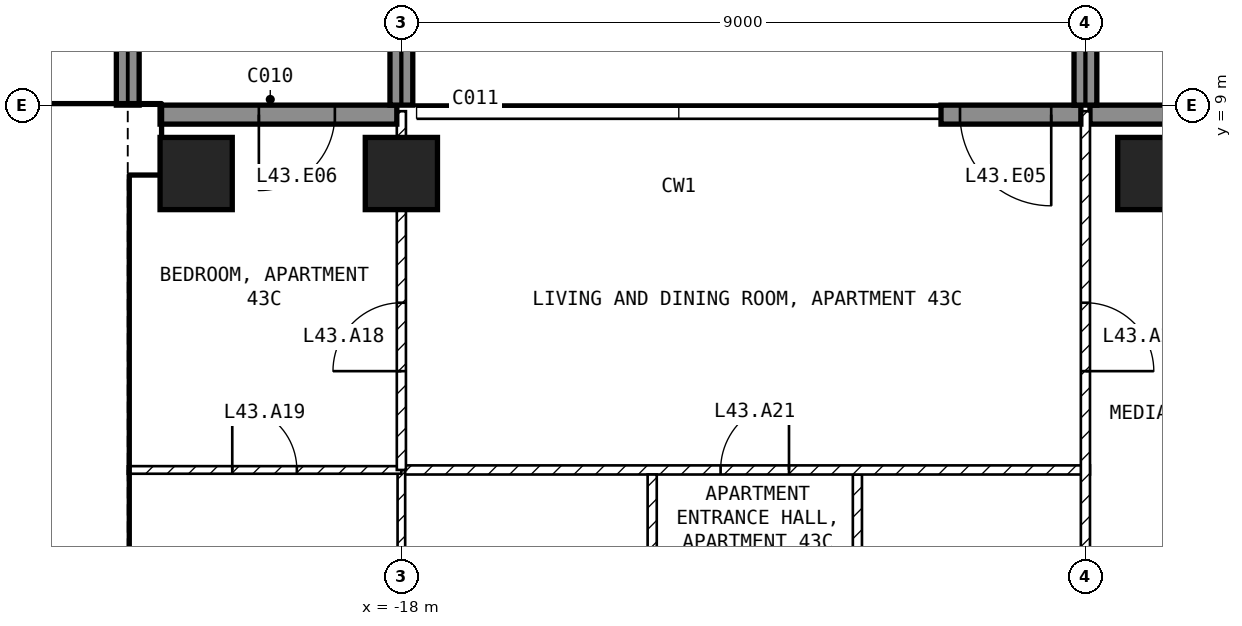
"""IFC4 building model, lengths in metres.
Left out: names, types, materials, properties, quantities, classifications, styles, units other than length and angle.
Written with IfcOpenShell. Run it as: python <this file> out.ifc"""

import sys

from ifc_helpers import new_model, si_unit, direction, frame, frame_2d, origin, origin_2d, place, context, subcontext, project, spatial, rectangle, extrude, element, fill, save


model = new_model("IFC4")
c1 = context("Model", 3, precision=1e-05, world=origin(), true_north=direction((0.0, 1.0)))
c2 = subcontext(c1, "Body", "Model", "MODEL_VIEW")
j1 = project(units=[si_unit("LENGTHUNIT", "METRE"), si_unit("PLANEANGLEUNIT", "RADIAN")], contexts=[c1])
p1 = place(None, origin())
s1 = spatial("IfcSite", under=j1, at=p1, CompositionType="ELEMENT")
p2 = place(p1, origin())
s2 = spatial("IfcBuilding", under=s1, at=p2, CompositionType="ELEMENT")
p3 = place(p2, frame((0.0, 0.0, 177.1)))
s3 = spatial("IfcBuildingStorey", under=s2, at=p3, CompositionType="ELEMENT", Elevation=177.1)
for number, where, z_axis, x_axis in (
    (1, (-20.7, 8.1, -0.25), (0.0, 0.0, 1.0), (1.0, 0.0, 0.0)),
    (2, (-18.0, 8.1, -0.25), (0.0, 0.0, 1.0), (1.0, 0.0, 0.0)),
    (3, (-8.1, 8.1, -0.25), (0.0, 0.0, 1.0), (1.0, 0.0, 0.0)),
):
    element("IfcColumn", number, at=place(p3, frame(where, z_axis=z_axis, x_axis=x_axis)), inside=s3, PredefinedType="COLUMN", context=c2, shape_type="SweptSolid", body=[
        extrude(rectangle(XDim=0.95, YDim=0.95, at=origin_2d()), origin(), (0.0, 0.0, 1.0), 3.5),
    ])
p4 = place(p3, frame((-5.825, 8.875, 0.0), z_axis=(0.0, 0.0, 1.0), x_axis=(-1.0, 0.0, 0.0)))
e4 = element("IfcWall", 4, at=p4, inside=s3, PredefinedType="SOLIDWALL", context=c2, shape_type="SweptSolid", body=[
    extrude(rectangle(XDim=3.115, YDim=0.25, at=frame_2d((1.558, 0.0))), origin(), (0.0, 0.0, 1.0), 3.25),
])
p5 = place(p4, frame((0.25, 0.0, 0.0)))
e5 = element("IfcOpeningElement", 5, at=p5, cuts=e4, PredefinedType="OPENING", context=c2, shape_type="SweptSolid", body=[
    extrude(rectangle(XDim=1.2, YDim=2.4, at=frame_2d((0.6, 1.2))), frame((0.0, 0.135, 0.0), z_axis=(0.0, -1.0, 0.0), x_axis=(1.0, 0.0, 0.0)), (0.0, 0.0, 1.0), 0.27),
])
p6 = place(p3, frame((-9.06, 8.875, 0.0), z_axis=(0.0, 0.0, 1.0), x_axis=(-1.0, 0.0, 0.0)))
e6 = element("IfcWall", 6, at=p6, inside=s3, PredefinedType="SOLIDWALL", context=c2, shape_type="SweptSolid", body=[
    extrude(rectangle(XDim=1.84, YDim=0.25, at=frame_2d((0.92, 0.0))), origin(), (0.0, 0.0, 1.0), 3.25),
])
p7 = place(p6, frame((0.39, 0.0, 0.0)))
e7 = element("IfcOpeningElement", 7, at=p7, cuts=e6, PredefinedType="OPENING", context=c2, shape_type="SweptSolid", body=[
    extrude(rectangle(XDim=1.2, YDim=2.4, at=frame_2d((0.6, 1.2))), frame((0.0, 0.135, 0.0), z_axis=(0.0, -1.0, 0.0), x_axis=(1.0, 0.0, 0.0)), (0.0, 0.0, 1.0), 0.27),
])
p8 = place(p3, frame((-18.06, 8.875, 0.0), z_axis=(0.0, 0.0, 1.0), x_axis=(-1.0, 0.0, 0.0)))
e8 = element("IfcWall", 8, at=p8, inside=s3, PredefinedType="SOLIDWALL", context=c2, shape_type="SweptSolid", body=[
    extrude(rectangle(XDim=3.115, YDim=0.25, at=frame_2d((1.558, 0.0))), origin(), (0.0, 0.0, 1.0), 3.25),
])
p9 = place(p8, frame((0.815, 0.0, 0.0)))
e9 = element("IfcOpeningElement", 9, at=p9, cuts=e8, PredefinedType="OPENING", context=c2, shape_type="SweptSolid", body=[
    extrude(rectangle(XDim=1.0, YDim=2.4, at=frame_2d((0.5, 1.2))), frame((0.0, 0.135, 0.0), z_axis=(0.0, -1.0, 0.0), x_axis=(1.0, 0.0, 0.0)), (0.0, 0.0, 1.0), 0.27),
])
for number, where, z_axis, x_axis in (
    (10, (-21.6, 9.0, 0.0), (0.0, 0.0, 1.0), (0.0, 1.0, 0.0)),
    (11, (-18.0, 9.0, 0.0), (0.0, 0.0, 1.0), (0.0, 1.0, 0.0)),
    (12, (-9.0, 9.0, 0.0), (0.0, 0.0, 1.0), (0.0, 1.0, 0.0)),
):
    element("IfcWall", number, at=place(p3, frame(where, z_axis=z_axis, x_axis=x_axis)), inside=s3, PredefinedType="SOLIDWALL", context=c2, shape_type="SweptSolid", body=[
        extrude(rectangle(XDim=2.7, YDim=0.3, at=frame_2d((1.35, 0.0))), origin(), (0.0, 0.0, 1.0), 3.25),
    ])
p10 = place(p3, frame((-29.6, 8.55, 0.0), z_axis=(0.0, 0.0, 1.0), x_axis=(1.0, 0.0, 0.0)))
e13 = element("IfcWall", 13, at=p10, inside=s3, PredefinedType="SHEAR", context=c2, shape_type="SweptSolid", body=[
    extrude(rectangle(XDim=8.425, YDim=0.9, at=frame_2d((4.212, 0.0))), origin(), (0.0, 0.0, 1.0), 3.25),
])
p11 = place(p3, frame((-21.825, 1.2, 0.0), z_axis=(0.0, 0.0, 1.0), x_axis=(0.0, 1.0, 0.0)))
e14 = element("IfcWall", 14, at=p11, inside=s3, PredefinedType="SHEAR", context=c2, shape_type="SweptSolid", body=[
    extrude(rectangle(XDim=6.9, YDim=0.45, at=frame_2d((3.45, 0.0))), origin(), (0.0, 0.0, 1.0), 3.25),
])
p12 = place(p3, frame((-28.35, 5.15, 0.0), z_axis=(0.0, 0.0, 1.0), x_axis=(1.0, 0.0, 0.0)))
e15 = element("IfcWall", 15, at=p12, inside=s3, PredefinedType="SOLIDWALL", context=c2, shape_type="SweptSolid", body=[
    extrude(rectangle(XDim=6.3, YDim=0.2, at=frame_2d((3.15, 0.0))), origin(), (0.0, 0.0, 1.0), 3.25),
])
p13 = place(p12, frame((5.1, 0.0, 0.0)))
e16 = element("IfcOpeningElement", 16, at=p13, cuts=e15, PredefinedType="OPENING", context=c2, shape_type="SweptSolid", body=[
    extrude(rectangle(XDim=1.0, YDim=2.1, at=frame_2d((0.5, 1.05))), frame((0.0, 0.11, 0.0), z_axis=(0.0, -1.0, 0.0), x_axis=(1.0, 0.0, 0.0)), (0.0, 0.0, 1.0), 0.22),
])
p14 = place(p3, frame((-12.0, 1.3, 0.0), z_axis=(0.0, 0.0, 1.0), x_axis=(0.0, 1.0, 0.0)))
e17 = element("IfcWall", 17, at=p14, inside=s3, PredefinedType="PARTITIONING", context=c2, shape_type="SweptSolid", body=[
    extrude(rectangle(XDim=2.84, YDim=0.12, at=frame_2d((1.42, 0.0))), origin(), (0.0, 0.0, 1.0), 3.25),
])
p15 = place(p14, frame((0.97, 0.0, 0.0)))
e18 = element("IfcOpeningElement", 18, at=p15, cuts=e17, PredefinedType="OPENING", context=c2, shape_type="SweptSolid", body=[
    extrude(rectangle(XDim=0.9, YDim=2.1, at=frame_2d((0.45, 1.05))), frame((0.0, 0.07, 0.0), z_axis=(0.0, -1.0, 0.0), x_axis=(1.0, 0.0, 0.0)), (0.0, 0.0, 1.0), 0.14),
])
p16 = place(p3, frame((-18.0, 4.2, 0.0), z_axis=(0.0, 0.0, 1.0), x_axis=(1.0, 0.0, 0.0)))
e19 = element("IfcWall", 19, at=p16, inside=s3, PredefinedType="PARTITIONING", context=c2, shape_type="SweptSolid", body=[
    extrude(rectangle(XDim=9.06, YDim=0.12, at=frame_2d((4.53, 0.0))), origin(), (0.0, 0.0, 1.0), 3.25),
])
p17 = place(p16, frame((4.2, 0.0, 0.0)))
e20 = element("IfcOpeningElement", 20, at=p17, cuts=e19, PredefinedType="OPENING", context=c2, shape_type="SweptSolid", body=[
    extrude(rectangle(XDim=0.9, YDim=2.1, at=frame_2d((0.45, 1.05))), frame((0.0, 0.07, 0.0), z_axis=(0.0, -1.0, 0.0), x_axis=(1.0, 0.0, 0.0)), (0.0, 0.0, 1.0), 0.14),
])
p18 = place(p3, frame((-9.0, 8.92, 0.0), z_axis=(0.0, 0.0, 1.0), x_axis=(0.0, -1.0, 0.0)))
e21 = element("IfcWall", 21, at=p18, inside=s3, PredefinedType="PARTITIONING", context=c2, shape_type="SweptSolid", body=[
    extrude(rectangle(XDim=7.62, YDim=0.12, at=frame_2d((3.81, 0.0))), origin(), (0.0, 0.0, 1.0), 3.25),
])
p19 = place(p18, frame((2.52, 0.0, 0.0)))
e22 = element("IfcOpeningElement", 22, at=p19, cuts=e21, PredefinedType="OPENING", context=c2, shape_type="SweptSolid", body=[
    extrude(rectangle(XDim=0.9, YDim=2.1, at=frame_2d((0.45, 1.05))), frame((0.0, 0.07, 0.0), z_axis=(0.0, -1.0, 0.0), x_axis=(1.0, 0.0, 0.0)), (0.0, 0.0, 1.0), 0.14),
])
p20 = place(p3, frame((-14.7, 1.3, 0.0), z_axis=(0.0, 0.0, 1.0), x_axis=(0.0, 1.0, 0.0)))
e23 = element("IfcWall", 23, at=p20, inside=s3, PredefinedType="PARTITIONING", context=c2, shape_type="SweptSolid", body=[
    extrude(rectangle(XDim=2.84, YDim=0.12, at=frame_2d((1.42, 0.0))), origin(), (0.0, 0.0, 1.0), 3.25),
])
p21 = place(p20, frame((0.97, 0.0, 0.0)))
e24 = element("IfcOpeningElement", 24, at=p21, cuts=e23, PredefinedType="OPENING", context=c2, shape_type="SweptSolid", body=[
    extrude(rectangle(XDim=0.9, YDim=2.1, at=frame_2d((0.45, 1.05))), frame((0.0, 0.07, 0.0), z_axis=(0.0, -1.0, 0.0), x_axis=(1.0, 0.0, 0.0)), (0.0, 0.0, 1.0), 0.14),
])
p22 = place(p3, frame((-18.0, 1.3, 0.0), z_axis=(0.0, 0.0, 1.0), x_axis=(0.0, 1.0, 0.0)))
e25 = element("IfcWall", 25, at=p22, inside=s3, PredefinedType="PARTITIONING", context=c2, shape_type="SweptSolid", body=[
    extrude(rectangle(XDim=2.9, YDim=0.1, at=frame_2d((1.45, 0.0))), origin(), (0.0, 0.0, 1.0), 2.48),
])
p23 = place(p3, frame((-21.6, 4.2, 0.0), z_axis=(0.0, 0.0, 1.0), x_axis=(1.0, 0.0, 0.0)))
e26 = element("IfcWall", 26, at=p23, inside=s3, PredefinedType="PARTITIONING", context=c2, shape_type="SweptSolid", body=[
    extrude(rectangle(XDim=3.6, YDim=0.1, at=frame_2d((1.8, 0.0))), origin(), (0.0, 0.0, 1.0), 3.25),
])
p24 = place(p23, frame((1.375, 0.0, 0.0)))
e27 = element("IfcOpeningElement", 27, at=p24, cuts=e26, PredefinedType="OPENING", context=c2, shape_type="SweptSolid", body=[
    extrude(rectangle(XDim=0.85, YDim=2.1, at=frame_2d((0.425, 1.05))), frame((0.0, 0.06, 0.0), z_axis=(0.0, -1.0, 0.0), x_axis=(1.0, 0.0, 0.0)), (0.0, 0.0, 1.0), 0.12),
])
p25 = place(p3, frame((-18.0, 4.2, 0.0), z_axis=(0.0, 0.0, 1.0), x_axis=(0.0, 1.0, 0.0)))
e28 = element("IfcWall", 28, at=p25, inside=s3, PredefinedType="PARTITIONING", context=c2, shape_type="SweptSolid", body=[
    extrude(rectangle(XDim=4.72, YDim=0.12, at=frame_2d((2.36, 0.0))), origin(), (0.0, 0.0, 1.0), 2.48),
])
p26 = place(p25, frame((1.3, 0.0, 0.0)))
e29 = element("IfcOpeningElement", 29, at=p26, cuts=e28, PredefinedType="OPENING", context=c2, shape_type="SweptSolid", body=[
    extrude(rectangle(XDim=0.9, YDim=2.1, at=frame_2d((0.45, 1.05))), frame((0.0, 0.07, 0.0), z_axis=(0.0, -1.0, 0.0), x_axis=(1.0, 0.0, 0.0)), (0.0, 0.0, 1.0), 0.14),
])
p27 = place(p7, origin())
e30 = element("IfcDoor", 30, at=p27, inside=s3, OperationType="SINGLE_SWING_LEFT", PredefinedType="DOOR", context=c2, shape_type="SweptSolid", body=[
    extrude(rectangle(XDim=1.2, YDim=2.4, at=frame_2d((0.6, 1.2))), frame((0.0, 0.025, 0.0), z_axis=(0.0, -1.0, 0.0), x_axis=(1.0, 0.0, 0.0)), (0.0, 0.0, 1.0), 0.05),
])
fill(e7, e30)
p28 = place(p9, origin())
e31 = element("IfcDoor", 31, at=p28, inside=s3, OperationType="SINGLE_SWING_RIGHT", PredefinedType="DOOR", context=c2, shape_type="SweptSolid", body=[
    extrude(rectangle(XDim=1.0, YDim=2.4, at=frame_2d((0.5, 1.2))), frame((0.0, 0.025, 0.0), z_axis=(0.0, -1.0, 0.0), x_axis=(1.0, 0.0, 0.0)), (0.0, 0.0, 1.0), 0.05),
])
fill(e9, e31)
p29 = place(p13, origin())
e32 = element("IfcDoor", 32, at=p29, inside=s3, OperationType="SINGLE_SWING_LEFT", PredefinedType="DOOR", context=c2, shape_type="SweptSolid", body=[
    extrude(rectangle(XDim=1.0, YDim=2.1, at=frame_2d((0.5, 1.05))), frame((0.0, 0.025, 0.0), z_axis=(0.0, -1.0, 0.0), x_axis=(1.0, 0.0, 0.0)), (0.0, 0.0, 1.0), 0.05),
])
fill(e16, e32)
p30 = place(p26, origin())
e33 = element("IfcDoor", 33, at=p30, inside=s3, OperationType="SINGLE_SWING_LEFT", PredefinedType="DOOR", context=c2, shape_type="SweptSolid", body=[
    extrude(rectangle(XDim=0.9, YDim=2.1, at=frame_2d((0.45, 1.05))), frame((0.0, 0.025, 0.0), z_axis=(0.0, -1.0, 0.0), x_axis=(1.0, 0.0, 0.0)), (0.0, 0.0, 1.0), 0.05),
])
fill(e29, e33)
p31 = place(p24, origin())
e34 = element("IfcDoor", 34, at=p31, inside=s3, OperationType="SINGLE_SWING_LEFT", PredefinedType="DOOR", context=c2, shape_type="SweptSolid", body=[
    extrude(rectangle(XDim=0.85, YDim=2.1, at=frame_2d((0.425, 1.05))), frame((0.0, 0.025, 0.0), z_axis=(0.0, -1.0, 0.0), x_axis=(1.0, 0.0, 0.0)), (0.0, 0.0, 1.0), 0.05),
])
fill(e27, e34)
p32 = place(p17, origin())
e35 = element("IfcDoor", 35, at=p32, inside=s3, OperationType="SINGLE_SWING_RIGHT", PredefinedType="DOOR", context=c2, shape_type="SweptSolid", body=[
    extrude(rectangle(XDim=0.9, YDim=2.1, at=frame_2d((0.45, 1.05))), frame((0.0, 0.025, 0.0), z_axis=(0.0, -1.0, 0.0), x_axis=(1.0, 0.0, 0.0)), (0.0, 0.0, 1.0), 0.05),
])
fill(e20, e35)
p33 = place(p19, origin())
e36 = element("IfcDoor", 36, at=p33, inside=s3, OperationType="SINGLE_SWING_RIGHT", PredefinedType="DOOR", context=c2, shape_type="SweptSolid", body=[
    extrude(rectangle(XDim=0.9, YDim=2.1, at=frame_2d((0.45, 1.05))), frame((0.0, 0.025, 0.0), z_axis=(0.0, -1.0, 0.0), x_axis=(1.0, 0.0, 0.0)), (0.0, 0.0, 1.0), 0.05),
])
fill(e22, e36)
save(model, sys.argv[1])
